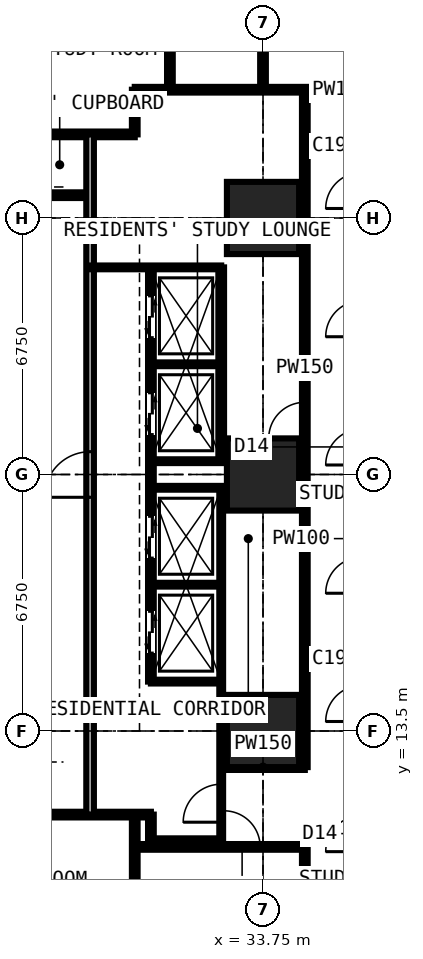
"""IFC4 building model, lengths in metres.
Left out: names, types, materials, properties, quantities, classifications, styles, units other than length and angle.
Written with IfcOpenShell. Run it as: python <this file> out.ifc"""

import sys

from ifc_helpers import new_model, si_unit, direction, frame, frame_2d, origin, origin_2d, place, context, subcontext, project, spatial, rectangle, extrude, element, fill, save


model = new_model("IFC4")
c1 = context("Model", 3, precision=1e-05, world=origin(), true_north=direction((0.0, 1.0)))
c2 = subcontext(c1, "Body", "Model", "MODEL_VIEW")
j1 = project(units=[si_unit("LENGTHUNIT", "METRE"), si_unit("PLANEANGLEUNIT", "RADIAN")], contexts=[c1])
p1 = place(None, origin())
s1 = spatial("IfcSite", under=j1, at=p1, CompositionType="ELEMENT")
p2 = place(p1, origin())
s2 = spatial("IfcBuilding", under=s1, at=p2, CompositionType="ELEMENT")
p3 = place(p2, frame((0.0, 0.0, 36.0)))
s3 = spatial("IfcBuildingStorey", under=s2, at=p3, CompositionType="ELEMENT", Elevation=36.0)
for number, where, z_axis, x_axis in (
    (1, (33.75, 13.5, 0.0), (0.0, 0.0, 1.0), (1.0, 0.0, 0.0)),
    (2, (33.75, 20.25, 0.0), (0.0, 0.0, 1.0), (1.0, 0.0, 0.0)),
    (3, (33.75, 27.0, 0.0), (0.0, 0.0, 1.0), (1.0, 0.0, 0.0)),
):
    element("IfcColumn", number, at=place(p3, frame(where, z_axis=z_axis, x_axis=x_axis)), inside=s3, PredefinedType="COLUMN", context=c2, shape_type="SweptSolid", body=[
        extrude(rectangle(XDim=1.9, YDim=1.9, at=origin_2d()), origin(), (0.0, 0.0, 1.0), 3.6),
    ])
p4 = place(p3, frame((10.125, 11.3, 0.0), z_axis=(0.0, 0.0, 1.0), x_axis=(1.0, 0.0, 0.0)))
e4 = element("IfcWall", 4, at=p4, inside=s3, PredefinedType="PARTITIONING", context=c2, shape_type="SweptSolid", body=[
    extrude(rectangle(XDim=20.675, YDim=0.15, at=frame_2d((10.337, 0.0))), origin(), (0.0, 0.0, 1.0), 3.375),
])
p5 = place(p4, frame((5.2, 0.0, 0.0)))
e5 = element("IfcOpeningElement", 5, at=p5, cuts=e4, PredefinedType="OPENING", context=c2, shape_type="SweptSolid", body=[
    extrude(rectangle(XDim=1.0, YDim=2.2, at=frame_2d((0.5, 1.1))), frame((0.0, 0.085, 0.0), z_axis=(0.0, -1.0, 0.0), x_axis=(1.0, 0.0, 0.0)), (0.0, 0.0, 1.0), 0.17),
])
p6 = place(p4, frame((11.312, 0.0, 0.0)))
e6 = element("IfcOpeningElement", 6, at=p6, cuts=e4, PredefinedType="OPENING", context=c2, shape_type="SweptSolid", body=[
    extrude(rectangle(XDim=1.0, YDim=2.2, at=frame_2d((0.5, 1.1))), frame((0.0, 0.085, 0.0), z_axis=(0.0, -1.0, 0.0), x_axis=(1.0, 0.0, 0.0)), (0.0, 0.0, 1.0), 0.17),
])
p7 = place(p4, frame((2.425, 0.0, 0.0)))
e7 = element("IfcOpeningElement", 7, at=p7, cuts=e4, PredefinedType="OPENING", context=c2, shape_type="SweptSolid", body=[
    extrude(rectangle(XDim=0.95, YDim=2.2, at=frame_2d((0.475, 1.1))), frame((0.0, 0.085, 0.0), z_axis=(0.0, -1.0, 0.0), x_axis=(1.0, 0.0, 0.0)), (0.0, 0.0, 1.0), 0.17),
])
p8 = place(p3, frame((11.3, 29.2, 0.0), z_axis=(0.0, 0.0, 1.0), x_axis=(1.0, 0.0, 0.0)))
e8 = element("IfcWall", 8, at=p8, inside=s3, PredefinedType="PARTITIONING", context=c2, shape_type="SweptSolid", body=[
    extrude(rectangle(XDim=19.075, YDim=0.15, at=frame_2d((9.538, 0.0))), origin(), (0.0, 0.0, 1.0), 3.375),
])
p9 = place(p8, frame((12.875, 0.0, 0.0)))
e9 = element("IfcOpeningElement", 9, at=p9, cuts=e8, PredefinedType="OPENING", context=c2, shape_type="SweptSolid", body=[
    extrude(rectangle(XDim=1.0, YDim=2.2, at=frame_2d((0.5, 1.1))), frame((0.0, 0.085, 0.0), z_axis=(0.0, -1.0, 0.0), x_axis=(1.0, 0.0, 0.0)), (0.0, 0.0, 1.0), 0.17),
])
p10 = place(p8, frame((10.438, 0.0, 0.0)))
e10 = element("IfcOpeningElement", 10, at=p10, cuts=e8, PredefinedType="OPENING", context=c2, shape_type="SweptSolid", body=[
    extrude(rectangle(XDim=1.0, YDim=2.2, at=frame_2d((0.5, 1.1))), frame((0.0, 0.085, 0.0), z_axis=(0.0, -1.0, 0.0), x_axis=(1.0, 0.0, 0.0)), (0.0, 0.0, 1.0), 0.17),
])
p11 = place(p8, frame((14.875, 0.0, 0.0)))
e11 = element("IfcOpeningElement", 11, at=p11, cuts=e8, PredefinedType="OPENING", context=c2, shape_type="SweptSolid", body=[
    extrude(rectangle(XDim=0.95, YDim=2.2, at=frame_2d((0.475, 1.1))), frame((0.0, 0.085, 0.0), z_axis=(0.0, -1.0, 0.0), x_axis=(1.0, 0.0, 0.0)), (0.0, 0.0, 1.0), 0.17),
])
p12 = place(p3, frame((27.6, 27.6, 0.0), z_axis=(0.0, 0.0, 1.0), x_axis=(1.0, 0.0, 0.0)))
e12 = element("IfcWall", 12, at=p12, inside=s3, PredefinedType="PARTITIONING", context=c2, shape_type="SweptSolid", body=[
    extrude(rectangle(XDim=1.6, YDim=0.15, at=frame_2d((0.8, 0.0))), origin(), (0.0, 0.0, 1.0), 2.877),
])
p13 = place(p3, frame((29.2, 11.3, 0.0), z_axis=(0.0, 0.0, 1.0), x_axis=(0.0, 1.0, 0.0)))
e13 = element("IfcWall", 13, at=p13, inside=s3, PredefinedType="PARTITIONING", context=c2, shape_type="SweptSolid", body=[
    extrude(rectangle(XDim=17.9, YDim=0.2, at=frame_2d((8.95, 0.0))), origin(), (0.0, 0.0, 1.0), 3.375),
])
p14 = place(p13, frame((8.35, 0.0, 0.0)))
e14 = element("IfcOpeningElement", 14, at=p14, cuts=e13, PredefinedType="OPENING", context=c2, shape_type="SweptSolid", body=[
    extrude(rectangle(XDim=1.2, YDim=2.2, at=frame_2d((0.6, 1.1))), frame((0.0, 0.11, 0.0), z_axis=(0.0, -1.0, 0.0), x_axis=(1.0, 0.0, 0.0)), (0.0, 0.0, 1.0), 0.22),
])
p15 = place(p3, frame((29.2, 25.7, 0.0), z_axis=(0.0, 0.0, 1.0), x_axis=(1.0, 0.0, 0.0)))
e15 = element("IfcWall", 15, at=p15, inside=s3, PredefinedType="SHEAR", context=c2, shape_type="SweptSolid", body=[
    extrude(rectangle(XDim=3.45, YDim=0.1, at=frame_2d((1.725, 0.0))), origin(), (0.0, 0.0, 1.0), 3.375),
])
p16 = place(p3, frame((30.375, -0.734, 0.0), z_axis=(0.0, 0.0, 1.0), x_axis=(0.0, 1.0, 0.0)))
e16 = element("IfcWall", 16, at=p16, inside=s3, PredefinedType="PARTITIONING", context=c2, shape_type="SweptSolid", body=[
    extrude(rectangle(XDim=12.034, YDim=0.15, at=frame_2d((6.017, 0.0))), origin(), (0.0, 0.0, 1.0), 3.375),
])
p17 = place(p16, frame((5.134, 0.0, 0.0)))
e17 = element("IfcOpeningElement", 17, at=p17, cuts=e16, PredefinedType="OPENING", context=c2, shape_type="SweptSolid", body=[
    extrude(rectangle(XDim=1.0, YDim=2.2, at=frame_2d((0.5, 1.1))), frame((0.0, 0.085, 0.0), z_axis=(0.0, -1.0, 0.0), x_axis=(1.0, 0.0, 0.0)), (0.0, 0.0, 1.0), 0.17),
])
p18 = place(p3, frame((30.375, 10.45, 0.0), z_axis=(0.0, 0.0, 1.0), x_axis=(1.0, 0.0, 0.0)))
e18 = element("IfcWall", 18, at=p18, inside=s3, PredefinedType="PARTITIONING", context=c2, shape_type="SweptSolid", body=[
    extrude(rectangle(XDim=4.475, YDim=0.15, at=frame_2d((2.238, 0.0))), origin(), (0.0, 0.0, 1.0), 3.375),
])
p19 = place(p18, frame((2.35, 0.0, 0.0)))
e19 = element("IfcOpeningElement", 19, at=p19, cuts=e18, PredefinedType="OPENING", context=c2, shape_type="SweptSolid", body=[
    extrude(rectangle(XDim=0.95, YDim=2.2, at=frame_2d((0.475, 1.1))), frame((0.0, 0.085, 0.0), z_axis=(0.0, -1.0, 0.0), x_axis=(1.0, 0.0, 0.0)), (0.0, 0.0, 1.0), 0.17),
])
p20 = place(p3, frame((30.375, 29.2, 0.0), z_axis=(0.0, 0.0, 1.0), x_axis=(0.0, 1.0, 0.0)))
e20 = element("IfcWall", 20, at=p20, inside=s3, PredefinedType="PARTITIONING", context=c2, shape_type="SweptSolid", body=[
    extrude(rectangle(XDim=1.175, YDim=0.15, at=frame_2d((0.587, 0.0))), origin(), (0.0, 0.0, 1.0), 3.375),
])
p21 = place(p3, frame((30.375, 30.375, 0.0), z_axis=(0.0, 0.0, 1.0), x_axis=(1.0, 0.0, 0.0)))
e21 = element("IfcWall", 21, at=p21, inside=s3, PredefinedType="PARTITIONING", context=c2, shape_type="SweptSolid", body=[
    extrude(rectangle(XDim=10.859, YDim=0.15, at=frame_2d((5.429, 0.0))), origin(), (0.0, 0.0, 1.0), 3.375),
])
p22 = place(p3, frame((30.8, 10.6, 0.0), z_axis=(0.0, 0.0, 1.0), x_axis=(0.0, 1.0, 0.0)))
e22 = element("IfcWall", 22, at=p22, inside=s3, PredefinedType="PARTITIONING", context=c2, shape_type="SweptSolid", body=[
    extrude(rectangle(XDim=0.7, YDim=0.15, at=frame_2d((0.35, 0.0))), origin(), (0.0, 0.0, 1.0), 3.375),
])
p23 = place(p3, frame((30.8, 10.6, 0.0), z_axis=(0.0, 0.0, 1.0), x_axis=(1.0, 0.0, 0.0)))
e23 = element("IfcWall", 23, at=p23, inside=s3, PredefinedType="PARTITIONING", context=c2, shape_type="SweptSolid", body=[
    extrude(rectangle(XDim=1.85, YDim=0.15, at=frame_2d((0.925, 0.0))), origin(), (0.0, 0.0, 1.0), 3.375),
])
p24 = place(p3, frame((30.8, 14.8, 0.0), z_axis=(0.0, 0.0, 1.0), x_axis=(0.0, 1.0, 0.0)))
e24 = element("IfcWall", 24, at=p24, inside=s3, PredefinedType="PARTITIONING", context=c2, shape_type="SweptSolid", body=[
    extrude(rectangle(XDim=10.9, YDim=0.15, at=frame_2d((5.45, 0.0))), origin(), (0.0, 0.0, 1.0), 3.375),
])
p25 = place(p24, frame((0.75, 0.0, 0.0)))
e25 = element("IfcOpeningElement", 25, at=p25, cuts=e24, PredefinedType="OPENING", context=c2, shape_type="SweptSolid", body=[
    extrude(rectangle(XDim=1.1, YDim=2.2, at=frame_2d((0.55, 1.1))), frame((0.0, 0.085, 0.0), z_axis=(0.0, -1.0, 0.0), x_axis=(1.0, 0.0, 0.0)), (0.0, 0.0, 1.0), 0.17),
])
p26 = place(p24, frame((3.25, 0.0, 0.0)))
e26 = element("IfcOpeningElement", 26, at=p26, cuts=e24, PredefinedType="OPENING", context=c2, shape_type="SweptSolid", body=[
    extrude(rectangle(XDim=1.1, YDim=2.2, at=frame_2d((0.55, 1.1))), frame((0.0, 0.085, 0.0), z_axis=(0.0, -1.0, 0.0), x_axis=(1.0, 0.0, 0.0)), (0.0, 0.0, 1.0), 0.17),
])
p27 = place(p24, frame((6.5, 0.0, 0.0)))
e27 = element("IfcOpeningElement", 27, at=p27, cuts=e24, PredefinedType="OPENING", context=c2, shape_type="SweptSolid", body=[
    extrude(rectangle(XDim=1.1, YDim=2.2, at=frame_2d((0.55, 1.1))), frame((0.0, 0.085, 0.0), z_axis=(0.0, -1.0, 0.0), x_axis=(1.0, 0.0, 0.0)), (0.0, 0.0, 1.0), 0.17),
])
p28 = place(p24, frame((9.05, 0.0, 0.0)))
e28 = element("IfcOpeningElement", 28, at=p28, cuts=e24, PredefinedType="OPENING", context=c2, shape_type="SweptSolid", body=[
    extrude(rectangle(XDim=1.1, YDim=2.2, at=frame_2d((0.55, 1.1))), frame((0.0, 0.085, 0.0), z_axis=(0.0, -1.0, 0.0), x_axis=(1.0, 0.0, 0.0)), (0.0, 0.0, 1.0), 0.17),
])
for number, where, z_axis, x_axis in (
    (29, (30.8, 14.8, 0.0), (0.0, 0.0, 1.0), (1.0, 0.0, 0.0)),
    (30, (30.8, 17.35, 0.0), (0.0, 0.0, 1.0), (1.0, 0.0, 0.0)),
    (31, (30.8, 19.9, 0.0), (0.0, 0.0, 1.0), (1.0, 0.0, 0.0)),
    (32, (30.8, 20.6, 0.0), (0.0, 0.0, 1.0), (1.0, 0.0, 0.0)),
    (33, (30.8, 23.15, 0.0), (0.0, 0.0, 1.0), (1.0, 0.0, 0.0)),
):
    element("IfcWall", number, at=place(p3, frame(where, z_axis=z_axis, x_axis=x_axis)), inside=s3, PredefinedType="SHEAR", context=c2, shape_type="SweptSolid", body=[
        extrude(rectangle(XDim=1.85, YDim=0.1, at=frame_2d((0.925, 0.0))), origin(), (0.0, 0.0, 1.0), 3.375),
    ])
p29 = place(p3, frame((31.3, 30.375, 0.0), z_axis=(0.0, 0.0, 1.0), x_axis=(0.0, 1.0, 0.0)))
e34 = element("IfcWall", 34, at=p29, inside=s3, PredefinedType="PARTITIONING", context=c2, shape_type="SweptSolid", body=[
    extrude(rectangle(XDim=4.475, YDim=0.15, at=frame_2d((2.238, 0.0))), origin(), (0.0, 0.0, 1.0), 3.375),
])
p30 = place(p3, frame((32.65, 10.6, 0.0), z_axis=(0.0, 0.0, 1.0), x_axis=(0.0, 1.0, 0.0)))
e35 = element("IfcWall", 35, at=p30, inside=s3, PredefinedType="SHEAR", context=c2, shape_type="SweptSolid", body=[
    extrude(rectangle(XDim=9.3, YDim=0.1, at=frame_2d((4.65, 0.0))), origin(), (0.0, 0.0, 1.0), 3.375),
])
p31 = place(p30, frame((0.5, 0.0, 0.0)))
e36 = element("IfcOpeningElement", 36, at=p31, cuts=e35, PredefinedType="OPENING", context=c2, shape_type="SweptSolid", body=[
    extrude(rectangle(XDim=1.0, YDim=2.2, at=frame_2d((0.5, 1.1))), frame((0.0, 0.06, 0.0), z_axis=(0.0, -1.0, 0.0), x_axis=(1.0, 0.0, 0.0)), (0.0, 0.0, 1.0), 0.12),
])
p32 = place(p3, frame((32.65, 12.55, 0.0), z_axis=(0.0, 0.0, 1.0), x_axis=(1.0, 0.0, 0.0)))
e37 = element("IfcWall", 37, at=p32, inside=s3, PredefinedType="PARTITIONING", context=c2, shape_type="SweptSolid", body=[
    extrude(rectangle(XDim=2.2, YDim=0.15, at=frame_2d((1.1, 0.0))), origin(), (0.0, 0.0, 1.0), 3.375),
])
p33 = place(p3, frame((32.65, 20.6, 0.0), z_axis=(0.0, 0.0, 1.0), x_axis=(0.0, 1.0, 0.0)))
e38 = element("IfcWall", 38, at=p33, inside=s3, PredefinedType="PARTITIONING", context=c2, shape_type="SweptSolid", body=[
    extrude(rectangle(XDim=5.1, YDim=0.15, at=frame_2d((2.55, 0.0))), origin(), (0.0, 0.0, 1.0), 3.375),
])
p34 = place(p3, frame((33.75, 30.375, 0.0), z_axis=(0.0, 0.0, 1.0), x_axis=(0.0, 1.0, 0.0)))
e39 = element("IfcWall", 39, at=p34, inside=s3, PredefinedType="PARTITIONING", context=c2, shape_type="SweptSolid", body=[
    extrude(rectangle(XDim=10.859, YDim=0.15, at=frame_2d((5.429, 0.0))), origin(), (0.0, 0.0, 1.0), 2.877),
])
p35 = place(p34, frame((1.4, 0.0, 0.0)))
e40 = element("IfcOpeningElement", 40, at=p35, cuts=e39, PredefinedType="OPENING", context=c2, shape_type="SweptSolid", body=[
    extrude(rectangle(XDim=1.0, YDim=2.2, at=frame_2d((0.5, 1.1))), frame((0.0, 0.085, 0.0), z_axis=(0.0, -1.0, 0.0), x_axis=(1.0, 0.0, 0.0)), (0.0, 0.0, 1.0), 0.17),
])
p36 = place(p3, frame((34.85, 6.75, 0.0), z_axis=(0.0, 0.0, 1.0), x_axis=(0.0, 1.0, 0.0)))
e41 = element("IfcWall", 41, at=p36, inside=s3, PredefinedType="PARTITIONING", context=c2, shape_type="SweptSolid", body=[
    extrude(rectangle(XDim=3.7, YDim=0.15, at=frame_2d((1.85, 0.0))), origin(), (0.0, 0.0, 1.0), 3.375),
])
p37 = place(p3, frame((34.85, 12.55, 0.0), z_axis=(0.0, 0.0, 1.0), x_axis=(0.0, 1.0, 0.0)))
e42 = element("IfcWall", 42, at=p37, inside=s3, PredefinedType="PARTITIONING", context=c2, shape_type="SweptSolid", body=[
    extrude(rectangle(XDim=17.825, YDim=0.15, at=frame_2d((8.913, 0.0))), origin(), (0.0, 0.0, 1.0), 3.375),
])
p38 = place(p37, frame((8.65, 0.0, 0.0)))
e43 = element("IfcOpeningElement", 43, at=p38, cuts=e42, PredefinedType="OPENING", context=c2, shape_type="SweptSolid", body=[
    extrude(rectangle(XDim=0.95, YDim=2.2, at=frame_2d((0.475, 1.1))), frame((0.0, 0.085, 0.0), z_axis=(0.0, -1.0, 0.0), x_axis=(1.0, 0.0, 0.0)), (0.0, 0.0, 1.0), 0.17),
])
p39 = place(p31, origin())
e44 = element("IfcDoor", 44, at=p39, inside=s3, OperationType="SINGLE_SWING_LEFT", PredefinedType="DOOR", context=c2, shape_type="SweptSolid", body=[
    extrude(rectangle(XDim=1.0, YDim=2.2, at=frame_2d((0.5, 1.1))), frame((0.0, 0.025, 0.0), z_axis=(0.0, -1.0, 0.0), x_axis=(1.0, 0.0, 0.0)), (0.0, 0.0, 1.0), 0.05),
])
fill(e36, e44)
p40 = place(p38, origin())
e45 = element("IfcDoor", 45, at=p40, inside=s3, OperationType="SINGLE_SWING_LEFT", PredefinedType="DOOR", context=c2, shape_type="SweptSolid", body=[
    extrude(rectangle(XDim=0.95, YDim=2.2, at=frame_2d((0.475, 1.1))), frame((0.0, 0.025, 0.0), z_axis=(0.0, -1.0, 0.0), x_axis=(1.0, 0.0, 0.0)), (0.0, 0.0, 1.0), 0.05),
])
fill(e43, e45)
p41 = place(p19, origin())
e46 = element("IfcDoor", 46, at=p41, inside=s3, OperationType="SINGLE_SWING_LEFT", PredefinedType="DOOR", context=c2, shape_type="SweptSolid", body=[
    extrude(rectangle(XDim=0.95, YDim=2.2, at=frame_2d((0.475, 1.1))), frame((0.0, 0.025, 0.0), z_axis=(0.0, -1.0, 0.0), x_axis=(1.0, 0.0, 0.0)), (0.0, 0.0, 1.0), 0.05),
])
fill(e19, e46)
p42 = place(p25, origin())
e47 = element("IfcDoor", 47, at=p42, inside=s3, OperationType="DOUBLE_DOOR_SLIDING", PredefinedType="DOOR", context=c2, shape_type="SweptSolid", body=[
    extrude(rectangle(XDim=1.1, YDim=2.2, at=frame_2d((0.55, 1.1))), frame((0.0, 0.025, 0.0), z_axis=(0.0, -1.0, 0.0), x_axis=(1.0, 0.0, 0.0)), (0.0, 0.0, 1.0), 0.05),
])
fill(e25, e47)
p43 = place(p26, origin())
e48 = element("IfcDoor", 48, at=p43, inside=s3, OperationType="DOUBLE_DOOR_SLIDING", PredefinedType="DOOR", context=c2, shape_type="SweptSolid", body=[
    extrude(rectangle(XDim=1.1, YDim=2.2, at=frame_2d((0.55, 1.1))), frame((0.0, 0.025, 0.0), z_axis=(0.0, -1.0, 0.0), x_axis=(1.0, 0.0, 0.0)), (0.0, 0.0, 1.0), 0.05),
])
fill(e26, e48)
p44 = place(p27, origin())
e49 = element("IfcDoor", 49, at=p44, inside=s3, OperationType="DOUBLE_DOOR_SLIDING", PredefinedType="DOOR", context=c2, shape_type="SweptSolid", body=[
    extrude(rectangle(XDim=1.1, YDim=2.2, at=frame_2d((0.55, 1.1))), frame((0.0, 0.025, 0.0), z_axis=(0.0, -1.0, 0.0), x_axis=(1.0, 0.0, 0.0)), (0.0, 0.0, 1.0), 0.05),
])
fill(e27, e49)
p45 = place(p28, origin())
e50 = element("IfcDoor", 50, at=p45, inside=s3, OperationType="DOUBLE_DOOR_SLIDING", PredefinedType="DOOR", context=c2, shape_type="SweptSolid", body=[
    extrude(rectangle(XDim=1.1, YDim=2.2, at=frame_2d((0.55, 1.1))), frame((0.0, 0.025, 0.0), z_axis=(0.0, -1.0, 0.0), x_axis=(1.0, 0.0, 0.0)), (0.0, 0.0, 1.0), 0.05),
])
fill(e28, e50)
p46 = place(p14, origin())
e51 = element("IfcDoor", 51, at=p46, inside=s3, OperationType="DOUBLE_DOOR_SINGLE_SWING", PredefinedType="DOOR", context=c2, shape_type="SweptSolid", body=[
    extrude(rectangle(XDim=1.2, YDim=2.2, at=frame_2d((0.6, 1.1))), frame((0.0, 0.025, 0.0), z_axis=(0.0, -1.0, 0.0), x_axis=(1.0, 0.0, 0.0)), (0.0, 0.0, 1.0), 0.05),
])
fill(e14, e51)
save(model, sys.argv[1])
